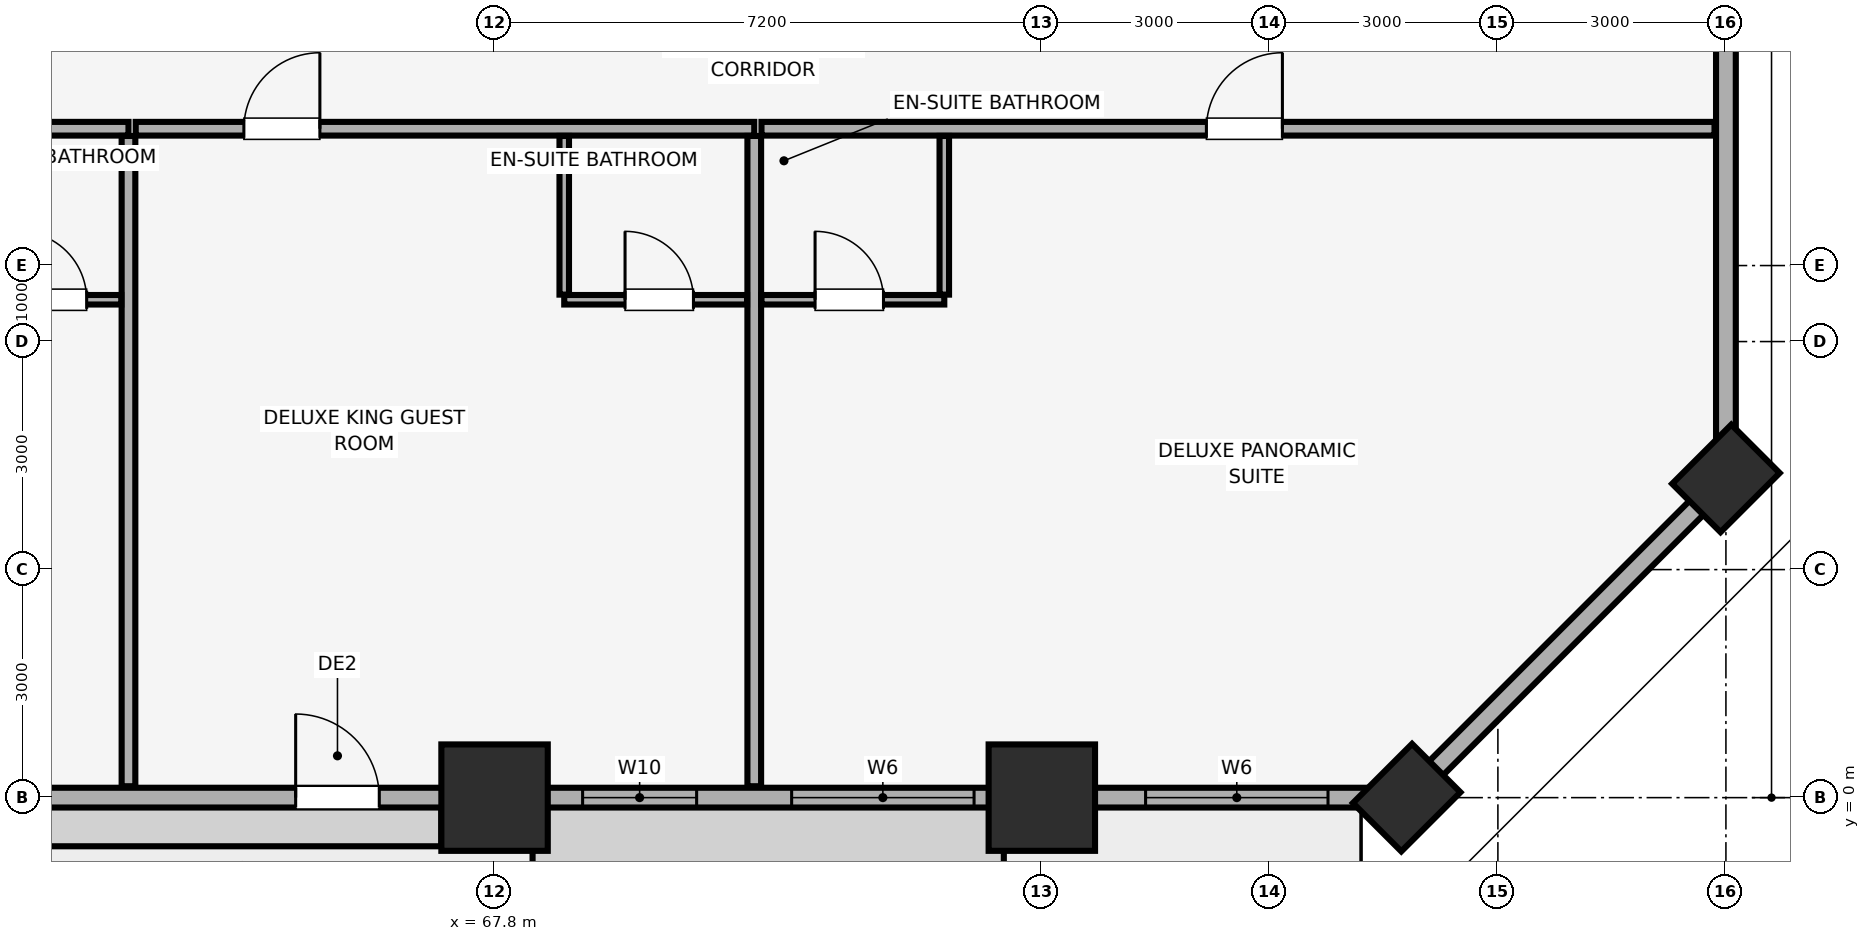
"""IFC4 building model, lengths in metres.
Left out: names, types, materials, properties, quantities, classifications, styles, units other than length and angle.
Written with IfcOpenShell. Run it as: python <this file> out.ifc"""

import sys

from ifc_helpers import new_model, si_unit, direction, frame, frame_2d, origin, origin_2d, place, context, subcontext, project, spatial, rectangle, extrude, element, fill, save


model = new_model("IFC4")
c1 = context("Model", 3, precision=1e-05, world=origin(), true_north=direction((0.0, 1.0)))
c2 = subcontext(c1, "Body", "Model", "MODEL_VIEW")
j1 = project(units=[si_unit("LENGTHUNIT", "METRE"), si_unit("PLANEANGLEUNIT", "RADIAN")], contexts=[c1])
p1 = place(None, origin())
s1 = spatial("IfcSite", under=j1, at=p1, CompositionType="ELEMENT")
p2 = place(p1, origin())
s2 = spatial("IfcBuilding", under=s1, at=p2, CompositionType="ELEMENT")
p3 = place(p2, frame((0.0, 0.0, 35.15)))
s3 = spatial("IfcBuildingStorey", under=s2, at=p3, CompositionType="ELEMENT", Elevation=35.15)
for number, where, z_axis, x_axis in (
    (1, (67.8, 0.0, 0.0), (0.0, 0.0, 1.0), (1.0, 0.0, 0.0)),
    (2, (75.0, 0.0, 0.0), (0.0, 0.0, 1.0), (1.0, 0.0, 0.0)),
):
    element("IfcColumn", number, at=place(p3, frame(where, z_axis=z_axis, x_axis=x_axis)), inside=s3, PredefinedType="COLUMN", context=c2, shape_type="SweptSolid", body=[
        extrude(rectangle(XDim=1.4, YDim=1.4, at=origin_2d()), origin(), (0.0, 0.0, 1.0), 3.51),
    ])
for number, where, z_axis, x_axis in (
    (3, (79.8, 0.0, 0.0), (0.0, 0.0, 1.0), (0.707, 0.707, 0.0)),
    (4, (84.0, 4.2, 0.0), (0.0, 0.0, 1.0), (0.707, 0.707, 0.0)),
):
    element("IfcColumn", number, at=place(p3, frame(where, z_axis=z_axis, x_axis=x_axis)), inside=s3, PredefinedType="PILASTER", context=c2, shape_type="SweptSolid", body=[
        extrude(rectangle(XDim=1.1, YDim=0.9, at=origin_2d()), origin(), (0.0, 0.0, 1.0), 3.51),
    ])
p4 = place(p3, frame((4.2, 0.0, 0.0), z_axis=(0.0, 0.0, 1.0), x_axis=(1.0, 0.0, 0.0)))
e5 = element("IfcWall", 5, at=p4, inside=s3, PredefinedType="SOLIDWALL", context=c2, shape_type="SweptSolid", body=[
    extrude(rectangle(XDim=75.6, YDim=0.26, at=frame_2d((37.8, 0.0))), origin(), (0.0, 0.0, 1.0), 2.56),
])
p5 = place(p4, frame((13.517, 0.0, 0.0)))
e6 = element("IfcOpeningElement", 6, at=p5, cuts=e5, PredefinedType="OPENING", context=c2, shape_type="SweptSolid", body=[
    extrude(rectangle(XDim=1.1, YDim=2.15, at=frame_2d((0.55, 1.075))), frame((0.0, 0.14, 0.0), z_axis=(0.0, -1.0, 0.0), x_axis=(1.0, 0.0, 0.0)), (0.0, 0.0, 1.0), 0.28),
])
p6 = place(p4, frame((28.183, 0.0, 0.0)))
e7 = element("IfcOpeningElement", 7, at=p6, cuts=e5, PredefinedType="OPENING", context=c2, shape_type="SweptSolid", body=[
    extrude(rectangle(XDim=1.1, YDim=2.15, at=frame_2d((0.55, 1.075))), frame((0.0, 0.14, 0.0), z_axis=(0.0, -1.0, 0.0), x_axis=(1.0, 0.0, 0.0)), (0.0, 0.0, 1.0), 0.28),
])
p7 = place(p4, frame((60.983, 0.0, 0.0)))
e8 = element("IfcOpeningElement", 8, at=p7, cuts=e5, PredefinedType="OPENING", context=c2, shape_type="SweptSolid", body=[
    extrude(rectangle(XDim=1.1, YDim=2.15, at=frame_2d((0.55, 1.075))), frame((0.0, 0.14, 0.0), z_axis=(0.0, -1.0, 0.0), x_axis=(1.0, 0.0, 0.0)), (0.0, 0.0, 1.0), 0.28),
])
p8 = place(p4, frame((1.035, 0.0, 0.85)))
e9 = element("IfcOpeningElement", 9, at=p8, cuts=e5, PredefinedType="OPENING", context=c2, shape_type="SweptSolid", body=[
    extrude(rectangle(XDim=2.4, YDim=1.5, at=frame_2d((1.2, 0.75))), frame((0.0, 0.14, 0.0), z_axis=(0.0, -1.0, 0.0), x_axis=(1.0, 0.0, 0.0)), (0.0, 0.0, 1.0), 0.28),
])
p9 = place(p4, frame((7.031, 0.0, 0.85)))
e10 = element("IfcOpeningElement", 10, at=p9, cuts=e5, PredefinedType="OPENING", context=c2, shape_type="SweptSolid", body=[
    extrude(rectangle(XDim=2.4, YDim=1.5, at=frame_2d((1.2, 0.75))), frame((0.0, 0.14, 0.0), z_axis=(0.0, -1.0, 0.0), x_axis=(1.0, 0.0, 0.0)), (0.0, 0.0, 1.0), 0.28),
])
p10 = place(p4, frame((16.757, 0.0, 0.85)))
e11 = element("IfcOpeningElement", 11, at=p10, cuts=e5, PredefinedType="OPENING", context=c2, shape_type="SweptSolid", body=[
    extrude(rectangle(XDim=1.5, YDim=1.4, at=frame_2d((0.75, 0.7))), frame((0.0, 0.14, 0.0), z_axis=(0.0, -1.0, 0.0), x_axis=(1.0, 0.0, 0.0)), (0.0, 0.0, 1.0), 0.28),
])
p11 = place(p4, frame((22.567, 0.0, 0.85)))
e12 = element("IfcOpeningElement", 12, at=p11, cuts=e5, PredefinedType="OPENING", context=c2, shape_type="SweptSolid", body=[
    extrude(rectangle(XDim=2.4, YDim=1.5, at=frame_2d((1.2, 0.75))), frame((0.0, 0.14, 0.0), z_axis=(0.0, -1.0, 0.0), x_axis=(1.0, 0.0, 0.0)), (0.0, 0.0, 1.0), 0.28),
])
p12 = place(p4, frame((30.065, 0.0, 0.85)))
e13 = element("IfcOpeningElement", 13, at=p12, cuts=e5, PredefinedType="OPENING", context=c2, shape_type="SweptSolid", body=[
    extrude(rectangle(XDim=1.5, YDim=1.4, at=frame_2d((0.75, 0.7))), frame((0.0, 0.14, 0.0), z_axis=(0.0, -1.0, 0.0), x_axis=(1.0, 0.0, 0.0)), (0.0, 0.0, 1.0), 0.28),
])
p13 = place(p4, frame((34.55, 0.0, 0.85)))
e14 = element("IfcOpeningElement", 14, at=p13, cuts=e5, PredefinedType="OPENING", context=c2, shape_type="SweptSolid", body=[
    extrude(rectangle(XDim=2.4, YDim=1.5, at=frame_2d((1.2, 0.75))), frame((0.0, 0.14, 0.0), z_axis=(0.0, -1.0, 0.0), x_axis=(1.0, 0.0, 0.0)), (0.0, 0.0, 1.0), 0.28),
])
p14 = place(p4, frame((38.35, 0.0, 0.85)))
e15 = element("IfcOpeningElement", 15, at=p14, cuts=e5, PredefinedType="OPENING", context=c2, shape_type="SweptSolid", body=[
    extrude(rectangle(XDim=2.4, YDim=1.5, at=frame_2d((1.2, 0.75))), frame((0.0, 0.14, 0.0), z_axis=(0.0, -1.0, 0.0), x_axis=(1.0, 0.0, 0.0)), (0.0, 0.0, 1.0), 0.28),
])
p15 = place(p4, frame((44.281, 0.0, 0.85)))
e16 = element("IfcOpeningElement", 16, at=p15, cuts=e5, PredefinedType="OPENING", context=c2, shape_type="SweptSolid", body=[
    extrude(rectangle(XDim=2.4, YDim=1.5, at=frame_2d((1.2, 0.75))), frame((0.0, 0.14, 0.0), z_axis=(0.0, -1.0, 0.0), x_axis=(1.0, 0.0, 0.0)), (0.0, 0.0, 1.0), 0.28),
])
p16 = place(p4, frame((50.332, 0.0, 0.85)))
e17 = element("IfcOpeningElement", 17, at=p16, cuts=e5, PredefinedType="OPENING", context=c2, shape_type="SweptSolid", body=[
    extrude(rectangle(XDim=2.4, YDim=1.5, at=frame_2d((1.2, 0.75))), frame((0.0, 0.14, 0.0), z_axis=(0.0, -1.0, 0.0), x_axis=(1.0, 0.0, 0.0)), (0.0, 0.0, 1.0), 0.28),
])
p17 = place(p4, frame((53.981, 0.0, 0.85)))
e18 = element("IfcOpeningElement", 18, at=p17, cuts=e5, PredefinedType="OPENING", context=c2, shape_type="SweptSolid", body=[
    extrude(rectangle(XDim=1.5, YDim=1.4, at=frame_2d((0.75, 0.7))), frame((0.0, 0.14, 0.0), z_axis=(0.0, -1.0, 0.0), x_axis=(1.0, 0.0, 0.0)), (0.0, 0.0, 1.0), 0.28),
])
p18 = place(p4, frame((64.759, 0.0, 0.85)))
e19 = element("IfcOpeningElement", 19, at=p18, cuts=e5, PredefinedType="OPENING", context=c2, shape_type="SweptSolid", body=[
    extrude(rectangle(XDim=1.5, YDim=1.4, at=frame_2d((0.75, 0.7))), frame((0.0, 0.14, 0.0), z_axis=(0.0, -1.0, 0.0), x_axis=(1.0, 0.0, 0.0)), (0.0, 0.0, 1.0), 0.28),
])
p19 = place(p4, frame((67.509, 0.0, 0.85)))
e20 = element("IfcOpeningElement", 20, at=p19, cuts=e5, PredefinedType="OPENING", context=c2, shape_type="SweptSolid", body=[
    extrude(rectangle(XDim=2.4, YDim=1.5, at=frame_2d((1.2, 0.75))), frame((0.0, 0.14, 0.0), z_axis=(0.0, -1.0, 0.0), x_axis=(1.0, 0.0, 0.0)), (0.0, 0.0, 1.0), 0.28),
])
p20 = place(p4, frame((72.165, 0.0, 0.85)))
e21 = element("IfcOpeningElement", 21, at=p20, cuts=e5, PredefinedType="OPENING", context=c2, shape_type="SweptSolid", body=[
    extrude(rectangle(XDim=2.4, YDim=1.5, at=frame_2d((1.2, 0.75))), frame((0.0, 0.14, 0.0), z_axis=(0.0, -1.0, 0.0), x_axis=(1.0, 0.0, 0.0)), (0.0, 0.0, 1.0), 0.28),
])
p21 = place(p3, frame((79.8, 0.0, 0.0), z_axis=(0.0, 0.0, 1.0), x_axis=(0.707106781187, 0.707106781187, 0.0)))
e22 = element("IfcWall", 22, at=p21, inside=s3, PredefinedType="SOLIDWALL", context=c2, shape_type="SweptSolid", body=[
    extrude(rectangle(XDim=5.94, YDim=0.26, at=frame_2d((2.97, 0.0))), origin(), (0.0, 0.0, 1.0), 2.56),
])
p22 = place(p3, frame((84.0, 4.2, 0.0), z_axis=(0.0, 0.0, 1.0), x_axis=(0.0, 1.0, 0.0)))
e23 = element("IfcWall", 23, at=p22, inside=s3, PredefinedType="SOLIDWALL", context=c2, shape_type="SweptSolid", body=[
    extrude(rectangle(XDim=40.6, YDim=0.26, at=frame_2d((20.3, 0.0))), origin(), (0.0, 0.0, 1.0), 2.56),
])
p23 = place(p22, frame((7.675, 0.0, 0.85)))
e24 = element("IfcOpeningElement", 24, at=p23, cuts=e23, PredefinedType="OPENING", context=c2, shape_type="SweptSolid", body=[
    extrude(rectangle(XDim=1.5, YDim=1.4, at=frame_2d((0.75, 0.7))), frame((0.0, 0.14, 0.0), z_axis=(0.0, -1.0, 0.0), x_axis=(1.0, 0.0, 0.0)), (0.0, 0.0, 1.0), 0.28),
])
p24 = place(p22, frame((12.76, 0.0, 0.85)))
e25 = element("IfcOpeningElement", 25, at=p24, cuts=e23, PredefinedType="OPENING", context=c2, shape_type="SweptSolid", body=[
    extrude(rectangle(XDim=1.5, YDim=1.4, at=frame_2d((0.75, 0.7))), frame((0.0, 0.14, 0.0), z_axis=(0.0, -1.0, 0.0), x_axis=(1.0, 0.0, 0.0)), (0.0, 0.0, 1.0), 0.28),
])
p25 = place(p22, frame((19.56, 0.0, 0.85)))
e26 = element("IfcOpeningElement", 26, at=p25, cuts=e23, PredefinedType="OPENING", context=c2, shape_type="SweptSolid", body=[
    extrude(rectangle(XDim=1.5, YDim=1.4, at=frame_2d((0.75, 0.7))), frame((0.0, 0.14, 0.0), z_axis=(0.0, -1.0, 0.0), x_axis=(1.0, 0.0, 0.0)), (0.0, 0.0, 1.0), 0.28),
])
p26 = place(p22, frame((29.2, 0.0, 0.85)))
e27 = element("IfcOpeningElement", 27, at=p26, cuts=e23, PredefinedType="OPENING", context=c2, shape_type="SweptSolid", body=[
    extrude(rectangle(XDim=1.5, YDim=1.4, at=frame_2d((0.75, 0.7))), frame((0.0, 0.14, 0.0), z_axis=(0.0, -1.0, 0.0), x_axis=(1.0, 0.0, 0.0)), (0.0, 0.0, 1.0), 0.28),
])
p27 = place(p22, frame((37.365, 0.0, 0.85)))
e28 = element("IfcOpeningElement", 28, at=p27, cuts=e23, PredefinedType="OPENING", context=c2, shape_type="SweptSolid", body=[
    extrude(rectangle(XDim=1.5, YDim=1.4, at=frame_2d((0.75, 0.7))), frame((0.0, 0.14, 0.0), z_axis=(0.0, -1.0, 0.0), x_axis=(1.0, 0.0, 0.0)), (0.0, 0.0, 1.0), 0.28),
])
p28 = place(p3, frame((57.758, 8.8, 0.0), z_axis=(0.0, 0.0, 1.0), x_axis=(1.0, 0.0, 0.0)))
e29 = element("IfcWall", 29, at=p28, inside=s3, PredefinedType="PARTITIONING", context=c2, shape_type="SweptSolid", body=[
    extrude(rectangle(XDim=5.226, YDim=0.18, at=frame_2d((2.613, 0.0))), origin(), (0.0, 0.0, 1.0), 3.51),
])
p29 = place(p28, frame((0.65, 0.0, 0.0)))
e30 = element("IfcOpeningElement", 30, at=p29, cuts=e29, PredefinedType="OPENING", context=c2, shape_type="SweptSolid", body=[
    extrude(rectangle(XDim=1.0, YDim=2.15, at=frame_2d((0.5, 1.075))), frame((0.0, 0.1, 0.0), z_axis=(0.0, -1.0, 0.0), x_axis=(1.0, 0.0, 0.0)), (0.0, 0.0, 1.0), 0.2),
])
p30 = place(p3, frame((62.984, 0.15, 0.0), z_axis=(0.0, 0.0, 1.0), x_axis=(0.0, 1.0, 0.0)))
e31 = element("IfcWall", 31, at=p30, inside=s3, PredefinedType="PARTITIONING", context=c2, shape_type="SweptSolid", body=[
    extrude(rectangle(XDim=8.555, YDim=0.18, at=frame_2d((4.278, 0.0))), origin(), (0.0, 0.0, 1.0), 3.51),
])
p31 = place(p3, frame((60.984, 6.55, 0.0), z_axis=(0.0, 0.0, 1.0), x_axis=(1.0, 0.0, 0.0)))
e32 = element("IfcWall", 32, at=p31, inside=s3, PredefinedType="PARTITIONING", context=c2, shape_type="SweptSolid", body=[
    extrude(rectangle(XDim=1.905, YDim=0.125, at=frame_2d((0.953, 0.0))), origin(), (0.0, 0.0, 1.0), 3.51),
])
p32 = place(p31, frame((0.55, 0.0, 0.0)))
e33 = element("IfcOpeningElement", 33, at=p32, cuts=e32, PredefinedType="OPENING", context=c2, shape_type="SweptSolid", body=[
    extrude(rectangle(XDim=0.9, YDim=2.1, at=frame_2d((0.45, 1.05))), frame((0.0, 0.073, 0.0), z_axis=(0.0, -1.0, 0.0), x_axis=(1.0, 0.0, 0.0)), (0.0, 0.0, 1.0), 0.145),
])
p33 = place(p3, frame((63.079, 8.8, 0.0), z_axis=(0.0, 0.0, 1.0), x_axis=(1.0, 0.0, 0.0)))
e34 = element("IfcWall", 34, at=p33, inside=s3, PredefinedType="PARTITIONING", context=c2, shape_type="SweptSolid", body=[
    extrude(rectangle(XDim=8.138, YDim=0.18, at=frame_2d((4.069, 0.0))), origin(), (0.0, 0.0, 1.0), 3.51),
])
p34 = place(p33, frame((1.423, 0.0, 0.0)))
e35 = element("IfcOpeningElement", 35, at=p34, cuts=e34, PredefinedType="OPENING", context=c2, shape_type="SweptSolid", body=[
    extrude(rectangle(XDim=1.0, YDim=2.15, at=frame_2d((0.5, 1.075))), frame((0.0, 0.1, 0.0), z_axis=(0.0, -1.0, 0.0), x_axis=(1.0, 0.0, 0.0)), (0.0, 0.0, 1.0), 0.2),
])
p35 = place(p3, frame((71.217, 0.15, 0.0), z_axis=(0.0, 0.0, 1.0), x_axis=(0.0, 1.0, 0.0)))
e36 = element("IfcWall", 36, at=p35, inside=s3, PredefinedType="PARTITIONING", context=c2, shape_type="SweptSolid", body=[
    extrude(rectangle(XDim=8.555, YDim=0.18, at=frame_2d((4.278, 0.0))), origin(), (0.0, 0.0, 1.0), 2.88),
])
p36 = place(p3, frame((68.717, 6.55, 0.0), z_axis=(0.0, 0.0, 1.0), x_axis=(1.0, 0.0, 0.0)))
e37 = element("IfcWall", 37, at=p36, inside=s3, PredefinedType="PARTITIONING", context=c2, shape_type="SweptSolid", body=[
    extrude(rectangle(XDim=2.405, YDim=0.125, at=frame_2d((1.202, 0.0))), origin(), (0.0, 0.0, 1.0), 3.51),
])
p37 = place(p36, frame((0.8, 0.0, 0.0)))
e38 = element("IfcOpeningElement", 38, at=p37, cuts=e37, PredefinedType="OPENING", context=c2, shape_type="SweptSolid", body=[
    extrude(rectangle(XDim=0.9, YDim=2.1, at=frame_2d((0.45, 1.05))), frame((0.0, 0.073, 0.0), z_axis=(0.0, -1.0, 0.0), x_axis=(1.0, 0.0, 0.0)), (0.0, 0.0, 1.0), 0.145),
])
p38 = place(p3, frame((68.717, 6.617, 0.0), z_axis=(0.0, 0.0, 1.0), x_axis=(0.0, 1.0, 0.0)))
e39 = element("IfcWall", 39, at=p38, inside=s3, PredefinedType="PARTITIONING", context=c2, shape_type="SweptSolid", body=[
    extrude(rectangle(XDim=2.088, YDim=0.125, at=frame_2d((1.044, 0.0))), origin(), (0.0, 0.0, 1.0), 3.51),
])
p39 = place(p3, frame((71.312, 8.8, 0.0), z_axis=(0.0, 0.0, 1.0), x_axis=(1.0, 0.0, 0.0)))
e40 = element("IfcWall", 40, at=p39, inside=s3, PredefinedType="PARTITIONING", context=c2, shape_type="SweptSolid", body=[
    extrude(rectangle(XDim=12.538, YDim=0.18, at=frame_2d((6.269, 0.0))), origin(), (0.0, 0.0, 1.0), 3.51),
])
p40 = place(p39, frame((5.853, 0.0, 0.0)))
e41 = element("IfcOpeningElement", 41, at=p40, cuts=e40, PredefinedType="OPENING", context=c2, shape_type="SweptSolid", body=[
    extrude(rectangle(XDim=1.0, YDim=2.15, at=frame_2d((0.5, 1.075))), frame((0.0, 0.1, 0.0), z_axis=(0.0, -1.0, 0.0), x_axis=(1.0, 0.0, 0.0)), (0.0, 0.0, 1.0), 0.2),
])
p41 = place(p3, frame((71.312, 6.55, 0.0), z_axis=(0.0, 0.0, 1.0), x_axis=(1.0, 0.0, 0.0)))
e42 = element("IfcWall", 42, at=p41, inside=s3, PredefinedType="PARTITIONING", context=c2, shape_type="SweptSolid", body=[
    extrude(rectangle(XDim=2.405, YDim=0.125, at=frame_2d((1.203, 0.0))), origin(), (0.0, 0.0, 1.0), 3.51),
])
p42 = place(p41, frame((0.705, 0.0, 0.0)))
e43 = element("IfcOpeningElement", 43, at=p42, cuts=e42, PredefinedType="OPENING", context=c2, shape_type="SweptSolid", body=[
    extrude(rectangle(XDim=0.9, YDim=2.1, at=frame_2d((0.45, 1.05))), frame((0.0, 0.073, 0.0), z_axis=(0.0, -1.0, 0.0), x_axis=(1.0, 0.0, 0.0)), (0.0, 0.0, 1.0), 0.145),
])
p43 = place(p3, frame((73.717, 6.617, 0.0), z_axis=(0.0, 0.0, 1.0), x_axis=(0.0, 1.0, 0.0)))
e44 = element("IfcWall", 44, at=p43, inside=s3, PredefinedType="PARTITIONING", context=c2, shape_type="SweptSolid", body=[
    extrude(rectangle(XDim=2.088, YDim=0.125, at=frame_2d((1.044, 0.0))), origin(), (0.0, 0.0, 1.0), 3.51),
])
p44 = place(p7, origin())
e45 = element("IfcDoor", 45, at=p44, inside=s3, OperationType="SINGLE_SWING_LEFT", PredefinedType="DOOR", context=c2, shape_type="SweptSolid", body=[
    extrude(rectangle(XDim=1.1, YDim=2.15, at=frame_2d((0.55, 1.075))), frame((0.0, 0.025, 0.0), z_axis=(0.0, -1.0, 0.0), x_axis=(1.0, 0.0, 0.0)), (0.0, 0.0, 1.0), 0.05),
])
fill(e8, e45)
p45 = place(p18, origin())
e46 = element("IfcWindow", 46, at=p45, inside=s3, PartitioningType="SINGLE_PANEL", PredefinedType="WINDOW", context=c2, shape_type="SweptSolid", body=[
    extrude(rectangle(XDim=1.5, YDim=1.4, at=frame_2d((0.75, 0.7))), frame((0.0, 0.03, 0.0), z_axis=(0.0, -1.0, 0.0), x_axis=(1.0, 0.0, 0.0)), (0.0, 0.0, 1.0), 0.06),
])
fill(e19, e46)
p46 = place(p19, origin())
e47 = element("IfcWindow", 47, at=p46, inside=s3, PartitioningType="SINGLE_PANEL", PredefinedType="WINDOW", context=c2, shape_type="SweptSolid", body=[
    extrude(rectangle(XDim=2.4, YDim=1.5, at=frame_2d((1.2, 0.75))), frame((0.0, 0.03, 0.0), z_axis=(0.0, -1.0, 0.0), x_axis=(1.0, 0.0, 0.0)), (0.0, 0.0, 1.0), 0.06),
])
fill(e20, e47)
p47 = place(p20, origin())
e48 = element("IfcWindow", 48, at=p47, inside=s3, PartitioningType="SINGLE_PANEL", PredefinedType="WINDOW", context=c2, shape_type="SweptSolid", body=[
    extrude(rectangle(XDim=2.4, YDim=1.5, at=frame_2d((1.2, 0.75))), frame((0.0, 0.03, 0.0), z_axis=(0.0, -1.0, 0.0), x_axis=(1.0, 0.0, 0.0)), (0.0, 0.0, 1.0), 0.06),
])
fill(e21, e48)
p48 = place(p32, origin())
e49 = element("IfcDoor", 49, at=p48, inside=s3, OperationType="SINGLE_SWING_LEFT", PredefinedType="DOOR", context=c2, shape_type="SweptSolid", body=[
    extrude(rectangle(XDim=0.9, YDim=2.1, at=frame_2d((0.45, 1.05))), frame((0.0, 0.025, 0.0), z_axis=(0.0, -1.0, 0.0), x_axis=(1.0, 0.0, 0.0)), (0.0, 0.0, 1.0), 0.05),
])
fill(e33, e49)
p49 = place(p34, origin())
e50 = element("IfcDoor", 50, at=p49, inside=s3, OperationType="SINGLE_SWING_RIGHT", PredefinedType="DOOR", context=c2, shape_type="SweptSolid", body=[
    extrude(rectangle(XDim=1.0, YDim=2.15, at=frame_2d((0.5, 1.075))), frame((0.0, 0.025, 0.0), z_axis=(0.0, -1.0, 0.0), x_axis=(1.0, 0.0, 0.0)), (0.0, 0.0, 1.0), 0.05),
])
fill(e35, e50)
p50 = place(p37, origin())
e51 = element("IfcDoor", 51, at=p50, inside=s3, OperationType="SINGLE_SWING_LEFT", PredefinedType="DOOR", context=c2, shape_type="SweptSolid", body=[
    extrude(rectangle(XDim=0.9, YDim=2.1, at=frame_2d((0.45, 1.05))), frame((0.0, 0.025, 0.0), z_axis=(0.0, -1.0, 0.0), x_axis=(1.0, 0.0, 0.0)), (0.0, 0.0, 1.0), 0.05),
])
fill(e38, e51)
p51 = place(p40, origin())
e52 = element("IfcDoor", 52, at=p51, inside=s3, OperationType="SINGLE_SWING_RIGHT", PredefinedType="DOOR", context=c2, shape_type="SweptSolid", body=[
    extrude(rectangle(XDim=1.0, YDim=2.15, at=frame_2d((0.5, 1.075))), frame((0.0, 0.025, 0.0), z_axis=(0.0, -1.0, 0.0), x_axis=(1.0, 0.0, 0.0)), (0.0, 0.0, 1.0), 0.05),
])
fill(e41, e52)
p52 = place(p42, origin())
e53 = element("IfcDoor", 53, at=p52, inside=s3, OperationType="SINGLE_SWING_LEFT", PredefinedType="DOOR", context=c2, shape_type="SweptSolid", body=[
    extrude(rectangle(XDim=0.9, YDim=2.1, at=frame_2d((0.45, 1.05))), frame((0.0, 0.025, 0.0), z_axis=(0.0, -1.0, 0.0), x_axis=(1.0, 0.0, 0.0)), (0.0, 0.0, 1.0), 0.05),
])
fill(e43, e53)
save(model, sys.argv[1])
